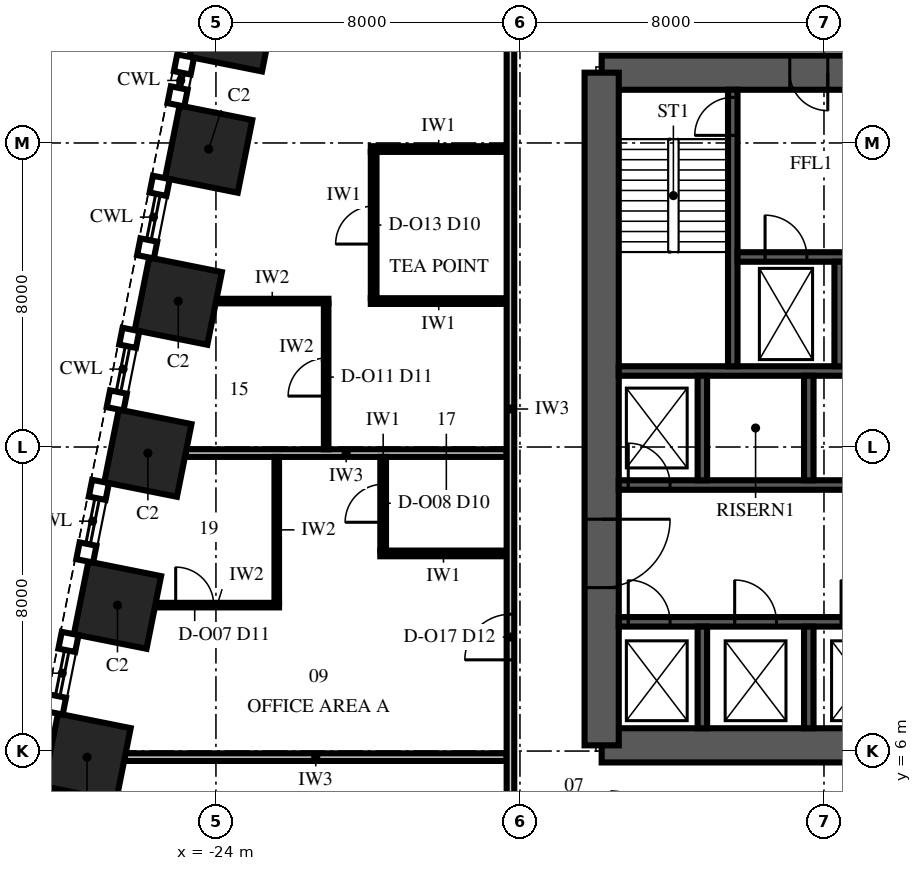
"""IFC4 building model, lengths in metres.
Left out: names, types, materials, properties, quantities, classifications, styles, units other than length and angle.
Written with IfcOpenShell. Run it as: python <this file> out.ifc"""

import sys

from ifc_helpers import new_model, si_unit, direction, frame, frame_2d, origin, origin_2d, place, context, subcontext, project, spatial, polyline, rectangle, outline, extrude, element, fill, save


model = new_model("IFC4")
c1 = context("Model", 3, precision=1e-05, world=origin(), true_north=direction((0.0, 1.0)))
c2 = subcontext(c1, "Body", "Model", "MODEL_VIEW")
j1 = project(units=[si_unit("LENGTHUNIT", "METRE"), si_unit("PLANEANGLEUNIT", "RADIAN")], contexts=[c1])
p1 = place(None, origin())
s1 = spatial("IfcSite", under=j1, at=p1, CompositionType="ELEMENT")
p2 = place(p1, origin())
s2 = spatial("IfcBuilding", under=s1, at=p2, CompositionType="ELEMENT")
p3 = place(p2, frame((0.0, 0.0, 36.0)))
s3 = spatial("IfcBuildingStorey", under=s2, at=p3, CompositionType="ELEMENT", Elevation=36.0)
for number, where, z_axis, x_axis in (
    (1, (-23.553, 25.029, 0.0), (0.0, 0.0, 1.0), (-0.196, -0.981, 0.0)),
    (2, (-24.191, 21.838, 0.0), (0.0, 0.0, 1.0), (-0.196, -0.981, 0.0)),
    (3, (-24.991, 17.838, 0.0), (0.0, 0.0, 1.0), (-0.196, -0.981, 0.0)),
    (4, (-25.791, 13.838, 0.0), (0.0, 0.0, 1.0), (-0.196, -0.981, 0.0)),
    (5, (-26.591, 9.838, 0.0), (0.0, 0.0, 1.0), (-0.196, -0.981, 0.0)),
    (6, (-27.391, 5.838, 0.0), (0.0, 0.0, 1.0), (-0.196, -0.981, 0.0)),
):
    element("IfcColumn", number, at=place(p3, frame(where, z_axis=z_axis, x_axis=x_axis)), inside=s3, PredefinedType="COLUMN", context=c2, shape_type="SweptSolid", body=[
        extrude(rectangle(XDim=1.95, YDim=1.95, at=origin_2d()), origin(), (0.0, 0.0, 1.0), 4.0),
    ])
p4 = place(p3, frame((-13.85, 6.15, 0.0), z_axis=(0.0, 0.0, 1.0), x_axis=(1.0, 0.0, 0.0)))
e7 = element("IfcWall", 7, at=p4, inside=s3, PredefinedType="SHEAR", context=c2, shape_type="SweptSolid", body=[
    extrude(rectangle(XDim=27.7, YDim=0.9, at=frame_2d((13.85, 0.0))), origin(), (0.0, 0.0, 1.0), 4.0),
])
p5 = place(p3, frame((13.85, 23.85, 0.0), z_axis=(0.0, 0.0, 1.0), x_axis=(-1.0, 0.0, 0.0)))
e8 = element("IfcWall", 8, at=p5, inside=s3, PredefinedType="SHEAR", context=c2, shape_type="SweptSolid", body=[
    extrude(rectangle(XDim=27.7, YDim=0.9, at=frame_2d((13.85, 0.0))), origin(), (0.0, 0.0, 1.0), 4.0),
])
p6 = place(p5, frame((21.75, 0.0, 0.0)))
e9 = element("IfcOpeningElement", 9, at=p6, cuts=e8, PredefinedType="OPENING", context=c2, shape_type="SweptSolid", body=[
    extrude(rectangle(XDim=1.0, YDim=2.1, at=frame_2d((0.5, 1.05))), frame((0.0, 0.465, 0.0), z_axis=(0.0, -1.0, 0.0), x_axis=(1.0, 0.0, 0.0)), (0.0, 0.0, 1.0), 0.93),
])
p7 = place(p5, frame((4.95, 0.0, 0.0)))
e10 = element("IfcOpeningElement", 10, at=p7, cuts=e8, PredefinedType="OPENING", context=c2, shape_type="SweptSolid", body=[
    extrude(rectangle(XDim=1.0, YDim=2.1, at=frame_2d((0.5, 1.05))), frame((0.0, 0.465, 0.0), z_axis=(0.0, -1.0, 0.0), x_axis=(1.0, 0.0, 0.0)), (0.0, 0.0, 1.0), 0.93),
])
p8 = place(p5, frame((17.35, 0.0, 0.0)))
e11 = element("IfcOpeningElement", 11, at=p8, cuts=e8, PredefinedType="OPENING", context=c2, shape_type="SweptSolid", body=[
    extrude(rectangle(XDim=1.0, YDim=2.1, at=frame_2d((0.5, 1.05))), frame((0.0, 0.465, 0.0), z_axis=(0.0, -1.0, 0.0), x_axis=(1.0, 0.0, 0.0)), (0.0, 0.0, 1.0), 0.93),
])
p9 = place(p5, frame((13.35, 0.0, 0.0)))
e12 = element("IfcOpeningElement", 12, at=p9, cuts=e8, PredefinedType="OPENING", context=c2, shape_type="SweptSolid", body=[
    extrude(rectangle(XDim=1.0, YDim=2.1, at=frame_2d((0.5, 1.05))), frame((0.0, 0.465, 0.0), z_axis=(0.0, -1.0, 0.0), x_axis=(1.0, 0.0, 0.0)), (0.0, 0.0, 1.0), 0.93),
])
p10 = place(p5, frame((9.35, 0.0, 0.0)))
e13 = element("IfcOpeningElement", 13, at=p10, cuts=e8, PredefinedType="OPENING", context=c2, shape_type="SweptSolid", body=[
    extrude(rectangle(XDim=1.0, YDim=2.1, at=frame_2d((0.5, 1.05))), frame((0.0, 0.465, 0.0), z_axis=(0.0, -1.0, 0.0), x_axis=(1.0, 0.0, 0.0)), (0.0, 0.0, 1.0), 0.93),
])
p11 = place(p3, frame((-13.85, 23.85, 0.0), z_axis=(0.0, 0.0, 1.0), x_axis=(0.0, -1.0, 0.0)))
e14 = element("IfcWall", 14, at=p11, inside=s3, PredefinedType="SHEAR", context=c2, shape_type="SweptSolid", body=[
    extrude(outline(polyline([(0.0, -0.45), (17.7, -0.45), (17.7, 0.0), (17.25, 0.0), (17.25, 0.45), (0.45, 0.45), (0.45, 0.0), (0.0, 0.0), (0.0, -0.45)])), origin(), (0.0, 0.0, 1.0), 4.0),
])
p12 = place(p11, frame((11.75, 0.0, 0.0)))
e15 = element("IfcOpeningElement", 15, at=p12, cuts=e14, PredefinedType="OPENING", context=c2, shape_type="SweptSolid", body=[
    extrude(rectangle(XDim=1.8, YDim=2.4, at=frame_2d((0.9, 1.2))), frame((0.0, 0.465, 0.0), z_axis=(0.0, -1.0, 0.0), x_axis=(1.0, 0.0, 0.0)), (0.0, 0.0, 1.0), 0.93),
])
p13 = place(p3, frame((-13.4, 9.4, 0.0), z_axis=(0.0, 0.0, 1.0), x_axis=(1.0, 0.0, 0.0)))
e16 = element("IfcWall", 16, at=p13, inside=s3, PredefinedType="SHEAR", context=c2, shape_type="SweptSolid", body=[
    extrude(rectangle(XDim=26.8, YDim=0.25, at=frame_2d((13.4, 0.0))), origin(), (0.0, 0.0, 1.0), 4.0),
])
p14 = place(p13, frame((0.25, 0.0, 0.0)))
e17 = element("IfcOpeningElement", 17, at=p14, cuts=e16, PredefinedType="OPENING", context=c2, shape_type="SweptSolid", body=[
    extrude(rectangle(XDim=1.1, YDim=2.1, at=frame_2d((0.55, 1.05))), frame((0.0, 0.14, 0.0), z_axis=(0.0, -1.0, 0.0), x_axis=(1.0, 0.0, 0.0)), (0.0, 0.0, 1.0), 0.28),
])
p15 = place(p13, frame((3.05, 0.0, 0.0)))
e18 = element("IfcOpeningElement", 18, at=p15, cuts=e16, PredefinedType="OPENING", context=c2, shape_type="SweptSolid", body=[
    extrude(rectangle(XDim=1.1, YDim=2.1, at=frame_2d((0.55, 1.05))), frame((0.0, 0.14, 0.0), z_axis=(0.0, -1.0, 0.0), x_axis=(1.0, 0.0, 0.0)), (0.0, 0.0, 1.0), 0.28),
])
p16 = place(p13, frame((5.85, 0.0, 0.0)))
e19 = element("IfcOpeningElement", 19, at=p16, cuts=e16, PredefinedType="OPENING", context=c2, shape_type="SweptSolid", body=[
    extrude(rectangle(XDim=1.1, YDim=2.1, at=frame_2d((0.55, 1.05))), frame((0.0, 0.14, 0.0), z_axis=(0.0, -1.0, 0.0), x_axis=(1.0, 0.0, 0.0)), (0.0, 0.0, 1.0), 0.28),
])
p17 = place(p3, frame((-13.4, 13.0, 0.0), z_axis=(0.0, 0.0, 1.0), x_axis=(1.0, 0.0, 0.0)))
e20 = element("IfcWall", 20, at=p17, inside=s3, PredefinedType="SHEAR", context=c2, shape_type="SweptSolid", body=[
    extrude(rectangle(XDim=26.8, YDim=0.25, at=frame_2d((13.4, 0.0))), origin(), (0.0, 0.0, 1.0), 4.0),
])
p18 = place(p17, frame((0.25, 0.0, 0.0)))
e21 = element("IfcOpeningElement", 21, at=p18, cuts=e20, PredefinedType="OPENING", context=c2, shape_type="SweptSolid", body=[
    extrude(rectangle(XDim=1.1, YDim=2.1, at=frame_2d((0.55, 1.05))), frame((0.0, 0.14, 0.0), z_axis=(0.0, -1.0, 0.0), x_axis=(1.0, 0.0, 0.0)), (0.0, 0.0, 1.0), 0.28),
])
p19 = place(p17, frame((8.65, 0.0, 0.0)))
e22 = element("IfcOpeningElement", 22, at=p19, cuts=e20, PredefinedType="OPENING", context=c2, shape_type="SweptSolid", body=[
    extrude(rectangle(XDim=1.1, YDim=2.1, at=frame_2d((0.55, 1.05))), frame((0.0, 0.14, 0.0), z_axis=(0.0, -1.0, 0.0), x_axis=(1.0, 0.0, 0.0)), (0.0, 0.0, 1.0), 0.28),
])
p20 = place(p17, frame((12.05, 0.0, 0.0)))
e23 = element("IfcOpeningElement", 23, at=p20, cuts=e20, PredefinedType="OPENING", context=c2, shape_type="SweptSolid", body=[
    extrude(rectangle(XDim=1.1, YDim=2.1, at=frame_2d((0.55, 1.05))), frame((0.0, 0.14, 0.0), z_axis=(0.0, -1.0, 0.0), x_axis=(1.0, 0.0, 0.0)), (0.0, 0.0, 1.0), 0.28),
])
p21 = place(p17, frame((15.35, 0.0, 0.0)))
e24 = element("IfcOpeningElement", 24, at=p21, cuts=e20, PredefinedType="OPENING", context=c2, shape_type="SweptSolid", body=[
    extrude(rectangle(XDim=0.9, YDim=2.1, at=frame_2d((0.45, 1.05))), frame((0.0, 0.14, 0.0), z_axis=(0.0, -1.0, 0.0), x_axis=(1.0, 0.0, 0.0)), (0.0, 0.0, 1.0), 0.28),
])
p22 = place(p17, frame((17.75, 0.0, 0.0)))
e25 = element("IfcOpeningElement", 25, at=p22, cuts=e20, PredefinedType="OPENING", context=c2, shape_type="SweptSolid", body=[
    extrude(rectangle(XDim=0.9, YDim=2.1, at=frame_2d((0.45, 1.05))), frame((0.0, 0.14, 0.0), z_axis=(0.0, -1.0, 0.0), x_axis=(1.0, 0.0, 0.0)), (0.0, 0.0, 1.0), 0.28),
])
p23 = place(p17, frame((19.95, 0.0, 0.0)))
e26 = element("IfcOpeningElement", 26, at=p23, cuts=e20, PredefinedType="OPENING", context=c2, shape_type="SweptSolid", body=[
    extrude(rectangle(XDim=0.9, YDim=2.1, at=frame_2d((0.45, 1.05))), frame((0.0, 0.14, 0.0), z_axis=(0.0, -1.0, 0.0), x_axis=(1.0, 0.0, 0.0)), (0.0, 0.0, 1.0), 0.28),
])
p24 = place(p17, frame((21.95, 0.0, 0.0)))
e27 = element("IfcOpeningElement", 27, at=p24, cuts=e20, PredefinedType="OPENING", context=c2, shape_type="SweptSolid", body=[
    extrude(rectangle(XDim=0.9, YDim=2.1, at=frame_2d((0.45, 1.05))), frame((0.0, 0.14, 0.0), z_axis=(0.0, -1.0, 0.0), x_axis=(1.0, 0.0, 0.0)), (0.0, 0.0, 1.0), 0.28),
])
p25 = place(p3, frame((-13.4, 16.0, 0.0), z_axis=(0.0, 0.0, 1.0), x_axis=(1.0, 0.0, 0.0)))
e28 = element("IfcWall", 28, at=p25, inside=s3, PredefinedType="SHEAR", context=c2, shape_type="SweptSolid", body=[
    extrude(rectangle(XDim=26.8, YDim=0.25, at=frame_2d((13.4, 0.0))), origin(), (0.0, 0.0, 1.0), 4.0),
])
for number, where, z_axis, x_axis in (
    (29, (-11.2, 6.6, 0.0), (0.0, 0.0, 1.0), (0.0, 1.0, 0.0)),
    (30, (-8.4, 6.6, 0.0), (0.0, 0.0, 1.0), (0.0, 1.0, 0.0)),
):
    element("IfcWall", number, at=place(p3, frame(where, z_axis=z_axis, x_axis=x_axis)), inside=s3, PredefinedType="SHEAR", context=c2, shape_type="SweptSolid", body=[
        extrude(rectangle(XDim=2.675, YDim=0.25, at=frame_2d((1.337, 0.0))), origin(), (0.0, 0.0, 1.0), 4.0),
    ])
for number, where, z_axis, x_axis in (
    (31, (-11.2, 13.125, 0.0), (0.0, 0.0, 1.0), (0.0, 1.0, 0.0)),
    (32, (-8.4, 13.125, 0.0), (0.0, 0.0, 1.0), (0.0, 1.0, 0.0)),
):
    element("IfcWall", number, at=place(p3, frame(where, z_axis=z_axis, x_axis=x_axis)), inside=s3, PredefinedType="SHEAR", context=c2, shape_type="SweptSolid", body=[
        extrude(rectangle(XDim=2.75, YDim=0.25, at=frame_2d((1.375, 0.0))), origin(), (0.0, 0.0, 1.0), 4.0),
    ])
p26 = place(p3, frame((-10.4, 16.125, 0.0), z_axis=(0.0, 0.0, 1.0), x_axis=(0.0, 1.0, 0.0)))
e33 = element("IfcWall", 33, at=p26, inside=s3, PredefinedType="SHEAR", context=c2, shape_type="SweptSolid", body=[
    extrude(rectangle(XDim=7.275, YDim=0.25, at=frame_2d((3.637, 0.0))), origin(), (0.0, 0.0, 1.0), 4.0),
])
p27 = place(p26, frame((6.075, 0.0, 0.0)))
e34 = element("IfcOpeningElement", 34, at=p27, cuts=e33, PredefinedType="OPENING", context=c2, shape_type="SweptSolid", body=[
    extrude(rectangle(XDim=1.0, YDim=2.1, at=frame_2d((0.5, 1.05))), frame((0.0, 0.14, 0.0), z_axis=(0.0, -1.0, 0.0), x_axis=(1.0, 0.0, 0.0)), (0.0, 0.0, 1.0), 0.28),
])
p28 = place(p3, frame((-10.275, 19.0, 0.0), z_axis=(0.0, 0.0, 1.0), x_axis=(1.0, 0.0, 0.0)))
e35 = element("IfcWall", 35, at=p28, inside=s3, PredefinedType="SHEAR", context=c2, shape_type="SweptSolid", body=[
    extrude(rectangle(XDim=3.75, YDim=0.25, at=frame_2d((1.875, 0.0))), origin(), (0.0, 0.0, 1.0), 4.0),
])
p29 = place(p28, frame((0.725, 0.0, 0.0)))
e36 = element("IfcOpeningElement", 36, at=p29, cuts=e35, PredefinedType="OPENING", context=c2, shape_type="SweptSolid", body=[
    extrude(rectangle(XDim=1.1, YDim=2.1, at=frame_2d((0.55, 1.05))), frame((0.0, 0.14, 0.0), z_axis=(0.0, -1.0, 0.0), x_axis=(1.0, 0.0, 0.0)), (0.0, 0.0, 1.0), 0.28),
])
p30 = place(p3, frame((-7.6, 16.125, 0.0), z_axis=(0.0, 0.0, 1.0), x_axis=(0.0, 1.0, 0.0)))
e37 = element("IfcWall", 37, at=p30, inside=s3, PredefinedType="SHEAR", context=c2, shape_type="SweptSolid", body=[
    extrude(rectangle(XDim=2.75, YDim=0.25, at=frame_2d((1.375, 0.0))), origin(), (0.0, 0.0, 1.0), 4.0),
])
p31 = place(p3, frame((-26.396, 5.84, 0.0), z_axis=(0.0, 0.0, 1.0), x_axis=(1.0, 0.0, 0.0)))
e38 = element("IfcWall", 38, at=p31, inside=s3, PredefinedType="PARTITIONING", context=c2, shape_type="SweptSolid", body=[
    extrude(rectangle(XDim=10.046, YDim=0.2, at=frame_2d((5.023, 0.0))), origin(), (0.0, 0.0, 1.0), 2.842),
])
p32 = place(p3, frame((-25.596, 9.84, 0.0), z_axis=(0.0, 0.0, 1.0), x_axis=(1.0, 0.0, 0.0)))
e39 = element("IfcWall", 39, at=p32, inside=s3, PredefinedType="PARTITIONING", context=c2, shape_type="SweptSolid", body=[
    extrude(rectangle(XDim=3.256, YDim=0.12, at=frame_2d((1.628, 0.0))), origin(), (0.0, 0.0, 1.0), 3.25),
])
p33 = place(p32, frame((0.537, 0.0, 0.0)))
e40 = element("IfcOpeningElement", 40, at=p33, cuts=e39, PredefinedType="OPENING", context=c2, shape_type="SweptSolid", body=[
    extrude(rectangle(XDim=1.0, YDim=2.4, at=frame_2d((0.5, 1.2))), frame((0.0, 0.075, 0.0), z_axis=(0.0, -1.0, 0.0), x_axis=(1.0, 0.0, 0.0)), (0.0, 0.0, 1.0), 0.15),
])
p34 = place(p3, frame((-19.675, 11.2, 0.0), z_axis=(0.0, 0.0, 1.0), x_axis=(1.0, 0.0, 0.0)))
e41 = element("IfcWall", 41, at=p34, inside=s3, PredefinedType="PARTITIONING", context=c2, shape_type="SweptSolid", body=[
    extrude(rectangle(XDim=3.325, YDim=0.15, at=frame_2d((1.663, 0.0))), origin(), (0.0, 0.0, 1.0), 3.85),
])
p35 = place(p3, frame((-24.796, 13.84, 0.0), z_axis=(0.0, 0.0, 1.0), x_axis=(1.0, 0.0, 0.0)))
e42 = element("IfcWall", 42, at=p35, inside=s3, PredefinedType="PARTITIONING", context=c2, shape_type="SweptSolid", body=[
    extrude(rectangle(XDim=8.446, YDim=0.2, at=frame_2d((4.223, 0.0))), origin(), (0.0, 0.0, 1.0), 3.25),
])
p36 = place(p3, frame((-23.996, 17.84, 0.0), z_axis=(0.0, 0.0, 1.0), x_axis=(1.0, 0.0, 0.0)))
e43 = element("IfcWall", 43, at=p36, inside=s3, PredefinedType="PARTITIONING", context=c2, shape_type="SweptSolid", body=[
    extrude(rectangle(XDim=2.956, YDim=0.12, at=frame_2d((1.478, 0.0))), origin(), (0.0, 0.0, 1.0), 3.25),
])
p37 = place(p3, frame((-19.925, 17.84, 0.0), z_axis=(0.0, 0.0, 1.0), x_axis=(1.0, 0.0, 0.0)))
e44 = element("IfcWall", 44, at=p37, inside=s3, PredefinedType="PARTITIONING", context=c2, shape_type="SweptSolid", body=[
    extrude(rectangle(XDim=3.575, YDim=0.15, at=frame_2d((1.788, 0.0))), origin(), (0.0, 0.0, 1.0), 3.25),
])
p38 = place(p3, frame((-19.925, 21.84, 0.0), z_axis=(0.0, 0.0, 1.0), x_axis=(1.0, 0.0, 0.0)))
e45 = element("IfcWall", 45, at=p38, inside=s3, PredefinedType="PARTITIONING", context=c2, shape_type="SweptSolid", body=[
    extrude(rectangle(XDim=3.575, YDim=0.15, at=frame_2d((1.788, 0.0))), origin(), (0.0, 0.0, 1.0), 3.4),
])
p39 = place(p3, frame((-22.4, 9.9, 0.0), z_axis=(0.0, 0.0, 1.0), x_axis=(0.0, 1.0, 0.0)))
e46 = element("IfcWall", 46, at=p39, inside=s3, PredefinedType="PARTITIONING", context=c2, shape_type="SweptSolid", body=[
    extrude(rectangle(XDim=3.84, YDim=0.12, at=frame_2d((1.92, 0.0))), origin(), (0.0, 0.0, 1.0), 3.85),
])
p40 = place(p3, frame((-21.1, 13.94, 0.0), z_axis=(0.0, 0.0, 1.0), x_axis=(0.0, 1.0, 0.0)))
e47 = element("IfcWall", 47, at=p40, inside=s3, PredefinedType="PARTITIONING", context=c2, shape_type="SweptSolid", body=[
    extrude(rectangle(XDim=3.84, YDim=0.12, at=frame_2d((1.92, 0.0))), origin(), (0.0, 0.0, 1.0), 3.25),
])
p41 = place(p40, frame((1.4, 0.0, 0.0)))
e48 = element("IfcOpeningElement", 48, at=p41, cuts=e47, PredefinedType="OPENING", context=c2, shape_type="SweptSolid", body=[
    extrude(rectangle(XDim=1.0, YDim=2.4, at=frame_2d((0.5, 1.2))), frame((0.0, 0.075, 0.0), z_axis=(0.0, -1.0, 0.0), x_axis=(1.0, 0.0, 0.0)), (0.0, 0.0, 1.0), 0.15),
])
p42 = place(p3, frame((-19.85, 17.915, 0.0), z_axis=(0.0, 0.0, 1.0), x_axis=(0.0, 1.0, 0.0)))
e49 = element("IfcWall", 49, at=p42, inside=s3, PredefinedType="PARTITIONING", context=c2, shape_type="SweptSolid", body=[
    extrude(rectangle(XDim=3.85, YDim=0.15, at=frame_2d((1.925, 0.0))), origin(), (0.0, 0.0, 1.0), 3.25),
])
p43 = place(p42, frame((1.425, 0.0, 0.0)))
e50 = element("IfcOpeningElement", 50, at=p43, cuts=e49, PredefinedType="OPENING", context=c2, shape_type="SweptSolid", body=[
    extrude(rectangle(XDim=1.0, YDim=2.3, at=frame_2d((0.5, 1.15))), frame((0.0, 0.09, 0.0), z_axis=(0.0, -1.0, 0.0), x_axis=(1.0, 0.0, 0.0)), (0.0, 0.0, 1.0), 0.18),
])
p44 = place(p3, frame((-19.6, 11.275, 0.0), z_axis=(0.0, 0.0, 1.0), x_axis=(0.0, 1.0, 0.0)))
e51 = element("IfcWall", 51, at=p44, inside=s3, PredefinedType="PARTITIONING", context=c2, shape_type="SweptSolid", body=[
    extrude(rectangle(XDim=2.465, YDim=0.15, at=frame_2d((1.232, 0.0))), origin(), (0.0, 0.0, 1.0), 3.85),
])
p45 = place(p44, frame((0.745, 0.0, 0.0)))
e52 = element("IfcOpeningElement", 52, at=p45, cuts=e51, PredefinedType="OPENING", context=c2, shape_type="SweptSolid", body=[
    extrude(rectangle(XDim=1.0, YDim=2.3, at=frame_2d((0.5, 1.15))), frame((0.0, 0.09, 0.0), z_axis=(0.0, -1.0, 0.0), x_axis=(1.0, 0.0, 0.0)), (0.0, 0.0, 1.0), 0.18),
])
p46 = place(p3, frame((-16.25, 3.85, 0.0), z_axis=(0.0, 0.0, 1.0), x_axis=(0.0, 1.0, 0.0)))
e53 = element("IfcWall", 53, at=p46, inside=s3, PredefinedType="PARTITIONING", context=c2, shape_type="SweptSolid", body=[
    extrude(rectangle(XDim=22.3, YDim=0.2, at=frame_2d((11.15, 0.0))), origin(), (0.0, 0.0, 1.0), 2.842),
])
p47 = place(p46, frame((4.55, 0.0, 0.0)))
e54 = element("IfcOpeningElement", 54, at=p47, cuts=e53, PredefinedType="OPENING", context=c2, shape_type="SweptSolid", body=[
    extrude(rectangle(XDim=1.2, YDim=2.4, at=frame_2d((0.6, 1.2))), frame((0.0, 0.115, 0.0), z_axis=(0.0, -1.0, 0.0), x_axis=(1.0, 0.0, 0.0)), (0.0, 0.0, 1.0), 0.23),
])
p48 = place(p12, origin())
e55 = element("IfcDoor", 55, at=p48, inside=s3, OperationType="DOUBLE_DOOR_SINGLE_SWING", PredefinedType="DOOR", context=c2, shape_type="SweptSolid", body=[
    extrude(rectangle(XDim=1.8, YDim=2.4, at=frame_2d((0.9, 1.2))), frame((0.0, 0.45, 0.0), z_axis=(0.0, -1.0, 0.0), x_axis=(1.0, 0.0, 0.0)), (0.0, 0.0, 1.0), 0.899),
])
fill(e15, e55)
p49 = place(p6, origin())
e56 = element("IfcDoor", 56, at=p49, inside=s3, OperationType="SINGLE_SWING_RIGHT", PredefinedType="DOOR", context=c2, shape_type="SweptSolid", body=[
    extrude(rectangle(XDim=1.0, YDim=2.1, at=frame_2d((0.5, 1.05))), frame((0.0, 0.45, 0.0), z_axis=(0.0, -1.0, 0.0), x_axis=(1.0, 0.0, 0.0)), (0.0, 0.0, 1.0), 0.899),
])
fill(e9, e56)
p50 = place(p27, origin())
e57 = element("IfcDoor", 57, at=p50, inside=s3, OperationType="SINGLE_SWING_LEFT", PredefinedType="DOOR", context=c2, shape_type="SweptSolid", body=[
    extrude(rectangle(XDim=1.0, YDim=2.1, at=frame_2d((0.5, 1.05))), frame((0.0, 0.125, 0.0), z_axis=(0.0, -1.0, 0.0), x_axis=(1.0, 0.0, 0.0)), (0.0, 0.0, 1.0), 0.25),
])
fill(e34, e57)
p51 = place(p14, origin())
e58 = element("IfcDoor", 58, at=p51, inside=s3, OperationType="SLIDING_TO_LEFT", PredefinedType="DOOR", context=c2, shape_type="SweptSolid", body=[
    extrude(rectangle(XDim=1.1, YDim=2.1, at=frame_2d((0.55, 1.05))), frame((0.0, 0.125, 0.0), z_axis=(0.0, -1.0, 0.0), x_axis=(1.0, 0.0, 0.0)), (0.0, 0.0, 1.0), 0.25),
])
fill(e17, e58)
p52 = place(p15, origin())
e59 = element("IfcDoor", 59, at=p52, inside=s3, OperationType="SLIDING_TO_LEFT", PredefinedType="DOOR", context=c2, shape_type="SweptSolid", body=[
    extrude(rectangle(XDim=1.1, YDim=2.1, at=frame_2d((0.55, 1.05))), frame((0.0, 0.125, 0.0), z_axis=(0.0, -1.0, 0.0), x_axis=(1.0, 0.0, 0.0)), (0.0, 0.0, 1.0), 0.25),
])
fill(e18, e59)
p53 = place(p16, origin())
e60 = element("IfcDoor", 60, at=p53, inside=s3, OperationType="SLIDING_TO_LEFT", PredefinedType="DOOR", context=c2, shape_type="SweptSolid", body=[
    extrude(rectangle(XDim=1.1, YDim=2.1, at=frame_2d((0.55, 1.05))), frame((0.0, 0.125, 0.0), z_axis=(0.0, -1.0, 0.0), x_axis=(1.0, 0.0, 0.0)), (0.0, 0.0, 1.0), 0.25),
])
fill(e19, e60)
p54 = place(p18, origin())
e61 = element("IfcDoor", 61, at=p54, inside=s3, OperationType="SLIDING_TO_LEFT", PredefinedType="DOOR", context=c2, shape_type="SweptSolid", body=[
    extrude(rectangle(XDim=1.1, YDim=2.1, at=frame_2d((0.55, 1.05))), frame((0.0, 0.125, 0.0), z_axis=(0.0, -1.0, 0.0), x_axis=(1.0, 0.0, 0.0)), (0.0, 0.0, 1.0), 0.25),
])
fill(e21, e61)
p55 = place(p29, origin())
e62 = element("IfcDoor", 62, at=p55, inside=s3, OperationType="SLIDING_TO_RIGHT", PredefinedType="DOOR", context=c2, shape_type="SweptSolid", body=[
    extrude(rectangle(XDim=1.1, YDim=2.1, at=frame_2d((0.55, 1.05))), frame((0.0, 0.125, 0.0), z_axis=(0.0, -1.0, 0.0), x_axis=(1.0, 0.0, 0.0)), (0.0, 0.0, 1.0), 0.25),
])
fill(e36, e62)
p56 = place(p33, origin())
e63 = element("IfcDoor", 63, at=p56, inside=s3, OperationType="SINGLE_SWING_RIGHT", PredefinedType="DOOR", context=c2, shape_type="SweptSolid", body=[
    extrude(rectangle(XDim=1.0, YDim=2.4, at=frame_2d((0.5, 1.2))), frame((0.0, 0.06, 0.0), z_axis=(0.0, -1.0, 0.0), x_axis=(1.0, 0.0, 0.0)), (0.0, 0.0, 1.0), 0.12),
])
fill(e40, e63)
p57 = place(p45, origin())
e64 = element("IfcDoor", 64, at=p57, inside=s3, OperationType="SINGLE_SWING_LEFT", PredefinedType="DOOR", context=c2, shape_type="SweptSolid", body=[
    extrude(rectangle(XDim=1.0, YDim=2.3, at=frame_2d((0.5, 1.15))), frame((0.0, 0.075, 0.0), z_axis=(0.0, -1.0, 0.0), x_axis=(1.0, 0.0, 0.0)), (0.0, 0.0, 1.0), 0.149),
])
fill(e52, e64)
p58 = place(p41, origin())
e65 = element("IfcDoor", 65, at=p58, inside=s3, OperationType="SINGLE_SWING_RIGHT", PredefinedType="DOOR", context=c2, shape_type="SweptSolid", body=[
    extrude(rectangle(XDim=1.0, YDim=2.4, at=frame_2d((0.5, 1.2))), frame((0.0, 0.06, 0.0), z_axis=(0.0, -1.0, 0.0), x_axis=(1.0, 0.0, 0.0)), (0.0, 0.0, 1.0), 0.12),
])
fill(e48, e65)
p59 = place(p43, origin())
e66 = element("IfcDoor", 66, at=p59, inside=s3, OperationType="SINGLE_SWING_LEFT", PredefinedType="DOOR", context=c2, shape_type="SweptSolid", body=[
    extrude(rectangle(XDim=1.0, YDim=2.3, at=frame_2d((0.5, 1.15))), frame((0.0, 0.075, 0.0), z_axis=(0.0, -1.0, 0.0), x_axis=(1.0, 0.0, 0.0)), (0.0, 0.0, 1.0), 0.149),
])
fill(e50, e66)
p60 = place(p47, origin())
e67 = element("IfcDoor", 67, at=p60, inside=s3, OperationType="SINGLE_SWING_LEFT", PredefinedType="DOOR", context=c2, shape_type="SweptSolid", body=[
    extrude(rectangle(XDim=1.2, YDim=2.4, at=frame_2d((0.6, 1.2))), frame((0.0, 0.1, 0.0), z_axis=(0.0, -1.0, 0.0), x_axis=(1.0, 0.0, 0.0)), (0.0, 0.0, 1.0), 0.199),
])
fill(e54, e67)
save(model, sys.argv[1])
